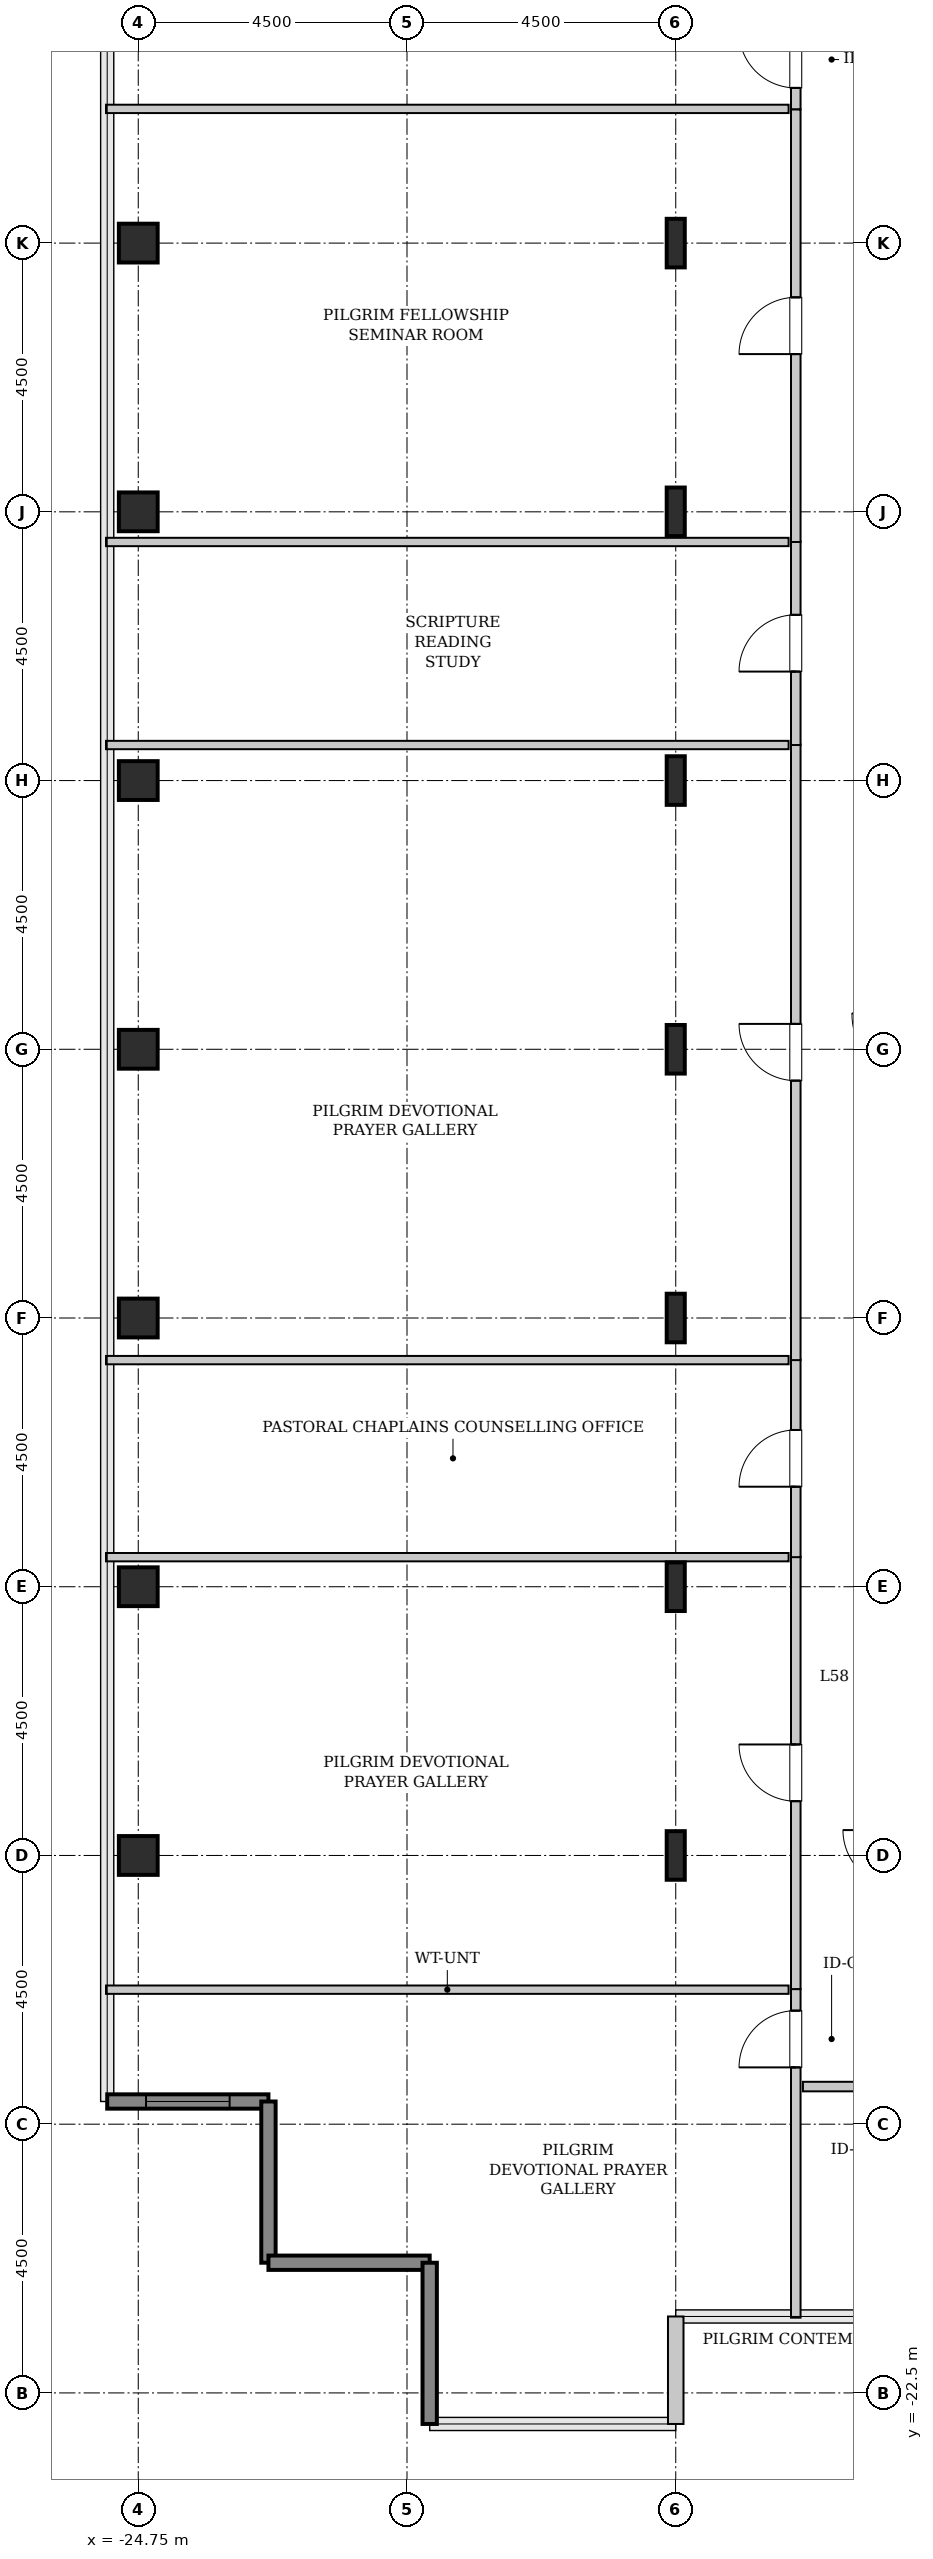
"""IFC4 building model, lengths in metres.
Left out: names, types, materials, properties, quantities, classifications, styles, units other than length and angle.
Written with IfcOpenShell. Run it as: python <this file> out.ifc"""

import sys

from ifc_helpers import new_model, si_unit, direction, frame, frame_2d, origin, origin_2d, place, context, subcontext, project, spatial, rectangle, hollow_rectangle, i_section, extrude, source, transform, mapped, element, fill, save


model = new_model("IFC4")
c1 = context("Model", 3, precision=1e-05, world=origin(), true_north=direction((0.0, 1.0)))
c2 = subcontext(c1, "Body", "Model", "MODEL_VIEW")
j1 = project(units=[si_unit("LENGTHUNIT", "METRE"), si_unit("PLANEANGLEUNIT", "RADIAN")], contexts=[c1])
p1 = place(None, origin())
s1 = spatial("IfcSite", under=j1, at=p1, CompositionType="ELEMENT")
p2 = place(p1, origin())
s2 = spatial("IfcBuilding", under=s1, at=p2, CompositionType="ELEMENT")
p3 = place(p2, frame((0.0, 0.0, 233.2)))
s3 = spatial("IfcBuildingStorey", under=s2, at=p3, CompositionType="ELEMENT", Elevation=233.2)
m1 = source(origin(), c2, "Body", "SweptSolid", [
    extrude(hollow_rectangle(XDim=0.65, YDim=0.65, WallThickness=0.032, InnerFilletRadius=0.032, OuterFilletRadius=0.064, at=origin_2d()), origin(), (0.0, 0.0, 1.0), 3.8),
])
for number, where, z_axis, x_axis in (
    (1, (-24.75, -13.5, 0.0), (0.0, 0.0, 1.0), (1.0, 0.0, 0.0)),
    (2, (-24.75, -9.0, 0.0), (0.0, 0.0, 1.0), (1.0, 0.0, 0.0)),
    (3, (-24.75, -4.5, 0.0), (0.0, 0.0, 1.0), (1.0, 0.0, 0.0)),
    (4, (-24.75, 0.0, 0.0), (0.0, 0.0, 1.0), (1.0, 0.0, 0.0)),
    (5, (-24.75, 4.5, 0.0), (0.0, 0.0, 1.0), (1.0, 0.0, 0.0)),
    (6, (-24.75, 9.0, 0.0), (0.0, 0.0, 1.0), (1.0, 0.0, 0.0)),
    (7, (-24.75, 13.5, 0.0), (0.0, 0.0, 1.0), (1.0, 0.0, 0.0)),
):
    element("IfcColumn", number, at=place(p3, frame(where, z_axis=z_axis, x_axis=x_axis)), inside=s3, PredefinedType="COLUMN", context=c2, shape_type="MappedRepresentation", body=[
        mapped(m1, transform((0.0, 0.0, 0.0), x_axis=(1.0, 0.0, 0.0), y_axis=(0.0, 1.0, 0.0), z_axis=(0.0, 0.0, 1.0), scale=1.0)),
    ])
m2 = source(origin(), c2, "Body", "SweptSolid", [
    extrude(i_section(OverallWidth=0.303, OverallDepth=0.814, WebThickness=0.021, FlangeThickness=0.04, FilletRadius=0.03, at=origin_2d()), origin(), (0.0, 0.0, 1.0), 3.8),
])
for number, where, z_axis, x_axis in (
    (8, (-15.75, -13.5, 0.0), (0.0, 0.0, 1.0), (1.0, 0.0, 0.0)),
    (9, (-15.75, -9.0, 0.0), (0.0, 0.0, 1.0), (1.0, 0.0, 0.0)),
    (10, (-15.75, -4.5, 0.0), (0.0, 0.0, 1.0), (1.0, 0.0, 0.0)),
    (11, (-15.75, 0.0, 0.0), (0.0, 0.0, 1.0), (1.0, 0.0, 0.0)),
    (12, (-15.75, 4.5, 0.0), (0.0, 0.0, 1.0), (1.0, 0.0, 0.0)),
    (13, (-15.75, 9.0, 0.0), (0.0, 0.0, 1.0), (1.0, 0.0, 0.0)),
    (14, (-15.75, 13.5, 0.0), (0.0, 0.0, 1.0), (1.0, 0.0, 0.0)),
):
    element("IfcColumn", number, at=place(p3, frame(where, z_axis=z_axis, x_axis=x_axis)), inside=s3, PredefinedType="COLUMN", context=c2, shape_type="MappedRepresentation", body=[
        mapped(m2, transform((0.0, 0.0, 0.0), x_axis=(1.0, 0.0, 0.0), y_axis=(0.0, 1.0, 0.0), z_axis=(0.0, 0.0, 1.0), scale=1.0)),
    ])
m3 = source(origin(), c2, "Body", "SweptSolid", [
    extrude(rectangle(XDim=2.7, YDim=0.24, at=frame_2d((1.35, 0.0))), origin(), (0.0, 0.0, 1.0), 3.55),
])
p4 = place(p3, frame((-25.27, -17.62, 0.0), z_axis=(0.0, 0.0, 1.0), x_axis=(1.0, 0.0, 0.0)))
e15 = element("IfcWall", 15, at=p4, inside=s3, PredefinedType="SHEAR", context=c2, shape_type="MappedRepresentation", body=[
    mapped(m3, transform((0.0, 0.0, 0.0), x_axis=(1.0, 0.0, 0.0), y_axis=(0.0, 1.0, 0.0), z_axis=(0.0, 0.0, 1.0), scale=1.0)),
])
p5 = place(p4, frame((0.65, 0.0, 0.85)))
e16 = element("IfcOpeningElement", 16, at=p5, cuts=e15, PredefinedType="OPENING", context=c2, shape_type="SweptSolid", body=[
    extrude(rectangle(XDim=1.4, YDim=1.8, at=frame_2d((0.7, 0.9))), frame((0.0, 0.13, 0.0), z_axis=(0.0, -1.0, 0.0), x_axis=(1.0, 0.0, 0.0)), (0.0, 0.0, 1.0), 0.26),
])
for number, where, z_axis, x_axis in (
    (17, (-22.57, -17.62, 0.0), (0.0, 0.0, 1.0), (0.0, -1.0, 0.0)),
    (18, (-22.57, -20.32, 0.0), (0.0, 0.0, 1.0), (1.0, 0.0, 0.0)),
    (19, (-19.87, -20.32, 0.0), (0.0, 0.0, 1.0), (0.0, -1.0, 0.0)),
):
    element("IfcWall", number, at=place(p3, frame(where, z_axis=z_axis, x_axis=x_axis)), inside=s3, PredefinedType="SHEAR", context=c2, shape_type="MappedRepresentation", body=[
        mapped(m3, transform((0.0, 0.0, 0.0), x_axis=(1.0, 0.0, 0.0), y_axis=(0.0, 1.0, 0.0), z_axis=(0.0, 0.0, 1.0), scale=1.0)),
    ])
m4 = source(origin(), c2, "Body", "SweptSolid", [
    extrude(rectangle(XDim=1.8, YDim=0.26, at=frame_2d((0.9, 0.0))), origin(), (0.0, 0.0, 1.0), 3.55),
])
p6 = place(p3, frame((-15.75, -23.02, 0.0), z_axis=(0.0, 0.0, 1.0), x_axis=(0.0, 1.0, 0.0)))
e20 = element("IfcWall", 20, at=p6, inside=s3, PredefinedType="SOLIDWALL", context=c2, shape_type="MappedRepresentation", body=[
    mapped(m4, transform((0.0, 0.0, 0.0), x_axis=(1.0, 0.0, 0.0), y_axis=(0.0, 1.0, 0.0), z_axis=(0.0, 0.0, 1.0), scale=1.0)),
])
m5 = source(origin(), c2, "Body", "SweptSolid", [
    extrude(rectangle(XDim=5.502, YDim=0.16, at=frame_2d((2.751, 0.0))), origin(), (0.0, 0.0, 1.0), 3.535),
])
p7 = place(p3, frame((-13.74, -21.24, 0.0), z_axis=(0.0, 0.0, 1.0), x_axis=(0.0, 1.0, 0.0)))
e21 = element("IfcWall", 21, at=p7, inside=s3, PredefinedType="PARTITIONING", context=c2, shape_type="MappedRepresentation", body=[
    mapped(m5, transform((0.0, 0.0, 0.0), x_axis=(1.0, 0.0, 0.0), y_axis=(0.0, 1.0, 0.0), z_axis=(0.0, 0.0, 1.0), scale=1.0)),
])
p8 = place(p7, frame((4.191, 0.0, 0.0)))
e22 = element("IfcOpeningElement", 22, at=p8, cuts=e21, PredefinedType="OPENING", context=c2, shape_type="SweptSolid", body=[
    extrude(rectangle(XDim=0.95, YDim=2.1, at=frame_2d((0.475, 1.05))), frame((0.0, 0.09, 0.0), z_axis=(0.0, -1.0, 0.0), x_axis=(1.0, 0.0, 0.0)), (0.0, 0.0, 1.0), 0.18),
])
m6 = source(origin(), c2, "Body", "SweptSolid", [
    extrude(rectangle(XDim=11.43, YDim=0.14, at=frame_2d((5.715, 0.0))), origin(), (0.0, 0.0, 1.0), 3.535),
])
p9 = place(p3, frame((-25.29, -15.748, 0.0), z_axis=(0.0, 0.0, 1.0), x_axis=(1.0, 0.0, 0.0)))
e23 = element("IfcWall", 23, at=p9, inside=s3, PredefinedType="PARTITIONING", context=c2, shape_type="MappedRepresentation", body=[
    mapped(m6, transform((0.0, 0.0, 0.0), x_axis=(1.0, 0.0, 0.0), y_axis=(0.0, 1.0, 0.0), z_axis=(0.0, 0.0, 1.0), scale=1.0)),
])
m7 = source(origin(), c2, "Body", "SweptSolid", [
    extrude(rectangle(XDim=7.242, YDim=0.16, at=frame_2d((3.621, 0.0))), origin(), (0.0, 0.0, 1.0), 3.535),
])
p10 = place(p3, frame((-13.74, -15.738, 0.0), z_axis=(0.0, 0.0, 1.0), x_axis=(0.0, 1.0, 0.0)))
e24 = element("IfcWall", 24, at=p10, inside=s3, PredefinedType="PARTITIONING", context=c2, shape_type="MappedRepresentation", body=[
    mapped(m7, transform((0.0, 0.0, 0.0), x_axis=(1.0, 0.0, 0.0), y_axis=(0.0, 1.0, 0.0), z_axis=(0.0, 0.0, 1.0), scale=1.0)),
])
p11 = place(p10, frame((3.146, 0.0, 0.0)))
e25 = element("IfcOpeningElement", 25, at=p11, cuts=e24, PredefinedType="OPENING", context=c2, shape_type="SweptSolid", body=[
    extrude(rectangle(XDim=0.95, YDim=2.1, at=frame_2d((0.475, 1.05))), frame((0.0, 0.09, 0.0), z_axis=(0.0, -1.0, 0.0), x_axis=(1.0, 0.0, 0.0)), (0.0, 0.0, 1.0), 0.18),
])
m8 = source(origin(), c2, "Body", "SweptSolid", [
    extrude(rectangle(XDim=11.43, YDim=0.14, at=frame_2d((5.715, 0.0))), origin(), (0.0, 0.0, 1.0), 2.925),
])
p12 = place(p3, frame((-25.29, -8.505, 0.0), z_axis=(0.0, 0.0, 1.0), x_axis=(1.0, 0.0, 0.0)))
e26 = element("IfcWall", 26, at=p12, inside=s3, PredefinedType="PARTITIONING", context=c2, shape_type="MappedRepresentation", body=[
    mapped(m8, transform((0.0, 0.0, 0.0), x_axis=(1.0, 0.0, 0.0), y_axis=(0.0, 1.0, 0.0), z_axis=(0.0, 0.0, 1.0), scale=1.0)),
])
m9 = source(origin(), c2, "Body", "SweptSolid", [
    extrude(rectangle(XDim=3.31, YDim=0.16, at=frame_2d((1.655, 0.0))), origin(), (0.0, 0.0, 1.0), 3.535),
])
p13 = place(p3, frame((-13.74, -8.505, 0.0), z_axis=(0.0, 0.0, 1.0), x_axis=(0.0, 1.0, 0.0)))
e27 = element("IfcWall", 27, at=p13, inside=s3, PredefinedType="PARTITIONING", context=c2, shape_type="MappedRepresentation", body=[
    mapped(m9, transform((0.0, 0.0, 0.0), x_axis=(1.0, 0.0, 0.0), y_axis=(0.0, 1.0, 0.0), z_axis=(0.0, 0.0, 1.0), scale=1.0)),
])
p14 = place(p13, frame((1.18, 0.0, 0.0)))
e28 = element("IfcOpeningElement", 28, at=p14, cuts=e27, PredefinedType="OPENING", context=c2, shape_type="SweptSolid", body=[
    extrude(rectangle(XDim=0.95, YDim=2.1, at=frame_2d((0.475, 1.05))), frame((0.0, 0.09, 0.0), z_axis=(0.0, -1.0, 0.0), x_axis=(1.0, 0.0, 0.0)), (0.0, 0.0, 1.0), 0.18),
])
p15 = place(p3, frame((-25.29, -5.205, 0.0), z_axis=(0.0, 0.0, 1.0), x_axis=(1.0, 0.0, 0.0)))
e29 = element("IfcWall", 29, at=p15, inside=s3, PredefinedType="PARTITIONING", context=c2, shape_type="MappedRepresentation", body=[
    mapped(m6, transform((0.0, 0.0, 0.0), x_axis=(1.0, 0.0, 0.0), y_axis=(0.0, 1.0, 0.0), z_axis=(0.0, 0.0, 1.0), scale=1.0)),
])
m10 = source(origin(), c2, "Body", "SweptSolid", [
    extrude(rectangle(XDim=10.31, YDim=0.16, at=frame_2d((5.155, 0.0))), origin(), (0.0, 0.0, 1.0), 3.535),
])
p16 = place(p3, frame((-13.74, -5.205, 0.0), z_axis=(0.0, 0.0, 1.0), x_axis=(0.0, 1.0, 0.0)))
e30 = element("IfcWall", 30, at=p16, inside=s3, PredefinedType="PARTITIONING", context=c2, shape_type="MappedRepresentation", body=[
    mapped(m10, transform((0.0, 0.0, 0.0), x_axis=(1.0, 0.0, 0.0), y_axis=(0.0, 1.0, 0.0), z_axis=(0.0, 0.0, 1.0), scale=1.0)),
])
p17 = place(p16, frame((4.68, 0.0, 0.0)))
e31 = element("IfcOpeningElement", 31, at=p17, cuts=e30, PredefinedType="OPENING", context=c2, shape_type="SweptSolid", body=[
    extrude(rectangle(XDim=0.95, YDim=2.1, at=frame_2d((0.475, 1.05))), frame((0.0, 0.09, 0.0), z_axis=(0.0, -1.0, 0.0), x_axis=(1.0, 0.0, 0.0)), (0.0, 0.0, 1.0), 0.18),
])
p18 = place(p3, frame((-25.29, 5.095, 0.0), z_axis=(0.0, 0.0, 1.0), x_axis=(1.0, 0.0, 0.0)))
e32 = element("IfcWall", 32, at=p18, inside=s3, PredefinedType="PARTITIONING", context=c2, shape_type="MappedRepresentation", body=[
    mapped(m6, transform((0.0, 0.0, 0.0), x_axis=(1.0, 0.0, 0.0), y_axis=(0.0, 1.0, 0.0), z_axis=(0.0, 0.0, 1.0), scale=1.0)),
])
m11 = source(origin(), c2, "Body", "SweptSolid", [
    extrude(rectangle(XDim=3.41, YDim=0.16, at=frame_2d((1.705, 0.0))), origin(), (0.0, 0.0, 1.0), 3.535),
])
p19 = place(p3, frame((-13.74, 5.095, 0.0), z_axis=(0.0, 0.0, 1.0), x_axis=(0.0, 1.0, 0.0)))
e33 = element("IfcWall", 33, at=p19, inside=s3, PredefinedType="PARTITIONING", context=c2, shape_type="MappedRepresentation", body=[
    mapped(m11, transform((0.0, 0.0, 0.0), x_axis=(1.0, 0.0, 0.0), y_axis=(0.0, 1.0, 0.0), z_axis=(0.0, 0.0, 1.0), scale=1.0)),
])
p20 = place(p19, frame((1.23, 0.0, 0.0)))
e34 = element("IfcOpeningElement", 34, at=p20, cuts=e33, PredefinedType="OPENING", context=c2, shape_type="SweptSolid", body=[
    extrude(rectangle(XDim=0.95, YDim=2.1, at=frame_2d((0.475, 1.05))), frame((0.0, 0.09, 0.0), z_axis=(0.0, -1.0, 0.0), x_axis=(1.0, 0.0, 0.0)), (0.0, 0.0, 1.0), 0.18),
])
p21 = place(p3, frame((-25.29, 8.495, 0.0), z_axis=(0.0, 0.0, 1.0), x_axis=(1.0, 0.0, 0.0)))
e35 = element("IfcWall", 35, at=p21, inside=s3, PredefinedType="PARTITIONING", context=c2, shape_type="MappedRepresentation", body=[
    mapped(m8, transform((0.0, 0.0, 0.0), x_axis=(1.0, 0.0, 0.0), y_axis=(0.0, 1.0, 0.0), z_axis=(0.0, 0.0, 1.0), scale=1.0)),
])
p22 = place(p3, frame((-13.74, 15.738, 0.0), z_axis=(0.0, 0.0, 1.0), x_axis=(0.0, 1.0, 0.0)))
e36 = element("IfcWall", 36, at=p22, inside=s3, PredefinedType="PARTITIONING", context=c2, shape_type="MappedRepresentation", body=[
    mapped(m5, transform((0.0, 0.0, 0.0), x_axis=(1.0, 0.0, 0.0), y_axis=(0.0, 1.0, 0.0), z_axis=(0.0, 0.0, 1.0), scale=1.0)),
])
p23 = place(p22, frame((0.361, 0.0, 0.0)))
e37 = element("IfcOpeningElement", 37, at=p23, cuts=e36, PredefinedType="OPENING", context=c2, shape_type="SweptSolid", body=[
    extrude(rectangle(XDim=0.95, YDim=2.1, at=frame_2d((0.475, 1.05))), frame((0.0, 0.09, 0.0), z_axis=(0.0, -1.0, 0.0), x_axis=(1.0, 0.0, 0.0)), (0.0, 0.0, 1.0), 0.18),
])
p24 = place(p3, frame((-25.29, 15.748, 0.0), z_axis=(0.0, 0.0, 1.0), x_axis=(1.0, 0.0, 0.0)))
e38 = element("IfcWall", 38, at=p24, inside=s3, PredefinedType="PARTITIONING", context=c2, shape_type="MappedRepresentation", body=[
    mapped(m6, transform((0.0, 0.0, 0.0), x_axis=(1.0, 0.0, 0.0), y_axis=(0.0, 1.0, 0.0), z_axis=(0.0, 0.0, 1.0), scale=1.0)),
])
p25 = place(p3, frame((-13.74, 8.495, 0.0), z_axis=(0.0, 0.0, 1.0), x_axis=(0.0, 1.0, 0.0)))
e39 = element("IfcWall", 39, at=p25, inside=s3, PredefinedType="PARTITIONING", context=c2, shape_type="MappedRepresentation", body=[
    mapped(m7, transform((0.0, 0.0, 0.0), x_axis=(1.0, 0.0, 0.0), y_axis=(0.0, 1.0, 0.0), z_axis=(0.0, 0.0, 1.0), scale=1.0)),
])
p26 = place(p25, frame((3.146, 0.0, 0.0)))
e40 = element("IfcOpeningElement", 40, at=p26, cuts=e39, PredefinedType="OPENING", context=c2, shape_type="SweptSolid", body=[
    extrude(rectangle(XDim=0.95, YDim=2.1, at=frame_2d((0.475, 1.05))), frame((0.0, 0.09, 0.0), z_axis=(0.0, -1.0, 0.0), x_axis=(1.0, 0.0, 0.0)), (0.0, 0.0, 1.0), 0.18),
])
m12 = source(origin(), c2, "Body", "SweptSolid", [
    extrude(rectangle(XDim=4.025, YDim=0.16, at=frame_2d((2.013, 0.0))), origin(), (0.0, 0.0, 1.0), 3.535),
])
p27 = place(p3, frame((-13.62, -17.37, 0.0), z_axis=(0.0, 0.0, 1.0), x_axis=(1.0, 0.0, 0.0)))
e41 = element("IfcWall", 41, at=p27, inside=s3, PredefinedType="PARTITIONING", context=c2, shape_type="MappedRepresentation", body=[
    mapped(m12, transform((0.0, 0.0, 0.0), x_axis=(1.0, 0.0, 0.0), y_axis=(0.0, 1.0, 0.0), z_axis=(0.0, 0.0, 1.0), scale=1.0)),
])
p28 = place(p27, frame((0.934, 0.0, 0.0)))
e42 = element("IfcOpeningElement", 42, at=p28, cuts=e41, PredefinedType="OPENING", context=c2, shape_type="SweptSolid", body=[
    extrude(rectangle(XDim=0.95, YDim=2.1, at=frame_2d((0.475, 1.05))), frame((0.0, 0.09, 0.0), z_axis=(0.0, -1.0, 0.0), x_axis=(1.0, 0.0, 0.0)), (0.0, 0.0, 1.0), 0.18),
])
m13 = source(origin(), c2, "Body", "SweptSolid", [
    extrude(rectangle(XDim=1.4, YDim=1.8, at=frame_2d((0.7, 0.9))), frame((0.0, 0.03, 0.0), z_axis=(0.0, -1.0, 0.0), x_axis=(1.0, 0.0, 0.0)), (0.0, 0.0, 1.0), 0.06),
])
p29 = place(p5, origin())
e43 = element("IfcWindow", 43, at=p29, inside=s3, PartitioningType="SINGLE_PANEL", PredefinedType="WINDOW", context=c2, shape_type="MappedRepresentation", body=[
    mapped(m13, transform((0.0, 0.0, 0.0), x_axis=(1.0, 0.0, 0.0), y_axis=(0.0, 1.0, 0.0), z_axis=(0.0, 0.0, 1.0), scale=1.0)),
])
fill(e16, e43)
m14 = source(origin(), c2, "Body", "SweptSolid", [
    extrude(rectangle(XDim=0.95, YDim=2.1, at=frame_2d((0.475, 1.05))), frame((0.0, 0.025, 0.0), z_axis=(0.0, -1.0, 0.0), x_axis=(1.0, 0.0, 0.0)), (0.0, 0.0, 1.0), 0.05),
])
p30 = place(p8, origin())
e44 = element("IfcDoor", 44, at=p30, inside=s3, OperationType="SINGLE_SWING_LEFT", PredefinedType="DOOR", context=c2, shape_type="MappedRepresentation", body=[
    mapped(m14, transform((0.0, 0.0, 0.0), x_axis=(1.0, 0.0, 0.0), y_axis=(0.0, 1.0, 0.0), z_axis=(0.0, 0.0, 1.0), scale=1.0)),
])
fill(e22, e44)
p31 = place(p11, origin())
e45 = element("IfcDoor", 45, at=p31, inside=s3, OperationType="SINGLE_SWING_RIGHT", PredefinedType="DOOR", context=c2, shape_type="MappedRepresentation", body=[
    mapped(m14, transform((0.0, 0.0, 0.0), x_axis=(1.0, 0.0, 0.0), y_axis=(0.0, 1.0, 0.0), z_axis=(0.0, 0.0, 1.0), scale=1.0)),
])
fill(e25, e45)
p32 = place(p14, origin())
e46 = element("IfcDoor", 46, at=p32, inside=s3, OperationType="SINGLE_SWING_LEFT", PredefinedType="DOOR", context=c2, shape_type="MappedRepresentation", body=[
    mapped(m14, transform((0.0, 0.0, 0.0), x_axis=(1.0, 0.0, 0.0), y_axis=(0.0, 1.0, 0.0), z_axis=(0.0, 0.0, 1.0), scale=1.0)),
])
fill(e28, e46)
p33 = place(p17, origin())
e47 = element("IfcDoor", 47, at=p33, inside=s3, OperationType="SINGLE_SWING_RIGHT", PredefinedType="DOOR", context=c2, shape_type="MappedRepresentation", body=[
    mapped(m14, transform((0.0, 0.0, 0.0), x_axis=(1.0, 0.0, 0.0), y_axis=(0.0, 1.0, 0.0), z_axis=(0.0, 0.0, 1.0), scale=1.0)),
])
fill(e31, e47)
p34 = place(p20, origin())
e48 = element("IfcDoor", 48, at=p34, inside=s3, OperationType="SINGLE_SWING_LEFT", PredefinedType="DOOR", context=c2, shape_type="MappedRepresentation", body=[
    mapped(m14, transform((0.0, 0.0, 0.0), x_axis=(1.0, 0.0, 0.0), y_axis=(0.0, 1.0, 0.0), z_axis=(0.0, 0.0, 1.0), scale=1.0)),
])
fill(e34, e48)
p35 = place(p23, origin())
e49 = element("IfcDoor", 49, at=p35, inside=s3, OperationType="SINGLE_SWING_RIGHT", PredefinedType="DOOR", context=c2, shape_type="MappedRepresentation", body=[
    mapped(m14, transform((0.0, 0.0, 0.0), x_axis=(1.0, 0.0, 0.0), y_axis=(0.0, 1.0, 0.0), z_axis=(0.0, 0.0, 1.0), scale=1.0)),
])
fill(e37, e49)
p36 = place(p26, origin())
e50 = element("IfcDoor", 50, at=p36, inside=s3, OperationType="SINGLE_SWING_LEFT", PredefinedType="DOOR", context=c2, shape_type="MappedRepresentation", body=[
    mapped(m14, transform((0.0, 0.0, 0.0), x_axis=(1.0, 0.0, 0.0), y_axis=(0.0, 1.0, 0.0), z_axis=(0.0, 0.0, 1.0), scale=1.0)),
])
fill(e40, e50)
save(model, sys.argv[1])
